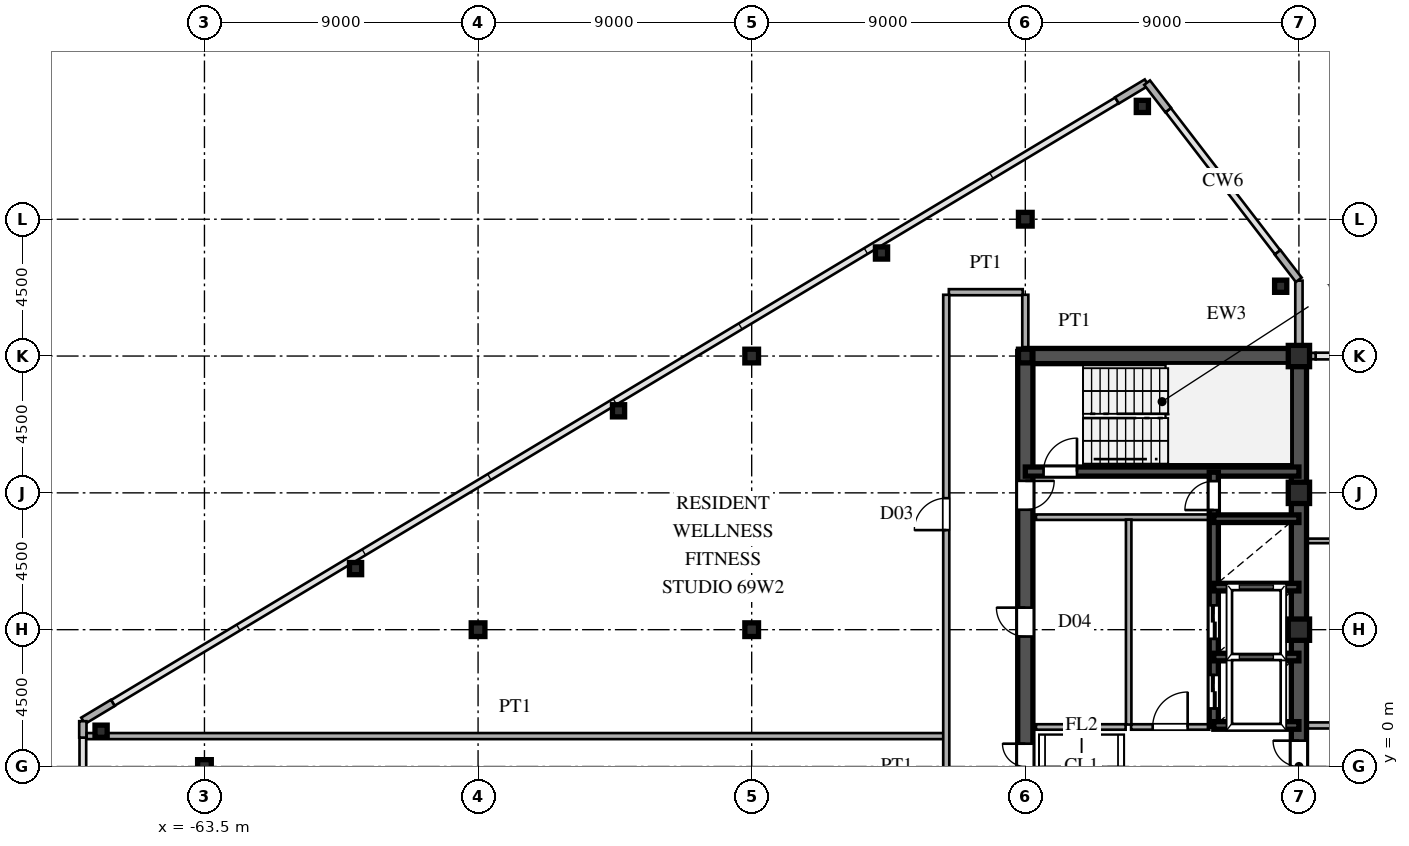
"""IFC4 building model, lengths in metres.
Left out: names, types, materials, properties, quantities, classifications, styles, units other than length and angle.
Written with IfcOpenShell. Run it as: python <this file> out.ifc"""

import sys

from ifc_helpers import new_model, si_unit, direction, frame, frame_2d, origin, origin_2d, place, context, subcontext, project, spatial, rectangle, hollow_rectangle, i_section, extrude, source, transform, mapped, element, fill, save


model = new_model("IFC4")
c1 = context("Model", 3, precision=1e-05, world=origin(), true_north=direction((0.0, 1.0)))
c2 = subcontext(c1, "Body", "Model", "MODEL_VIEW")
j1 = project(units=[si_unit("LENGTHUNIT", "METRE"), si_unit("PLANEANGLEUNIT", "RADIAN")], contexts=[c1])
p1 = place(None, origin())
s1 = spatial("IfcSite", under=j1, at=p1, CompositionType="ELEMENT")
p2 = place(p1, origin())
s2 = spatial("IfcBuilding", under=s1, at=p2, CompositionType="ELEMENT")
p3 = place(p2, frame((0.0, 0.0, 261.9)))
s3 = spatial("IfcBuildingStorey", under=s2, at=p3, CompositionType="ELEMENT", Elevation=261.9)
m1 = source(origin(), c2, "Body", "SweptSolid", [
    extrude(hollow_rectangle(XDim=0.7, YDim=0.7, WallThickness=0.03, at=origin_2d()), origin(), (0.0, 0.0, 1.0), 3.75),
])
for number, where, z_axis, x_axis in (
    (1, (-27.5, 4.5, 0.0), (0.0, 0.0, 1.0), (1.0, 0.0, 0.0)),
    (2, (-27.5, 9.0, 0.0), (0.0, 0.0, 1.0), (1.0, 0.0, 0.0)),
    (3, (-27.5, 13.5, 0.0), (0.0, 0.0, 1.0), (1.0, 0.0, 0.0)),
):
    element("IfcColumn", number, at=place(p3, frame(where, z_axis=z_axis, x_axis=x_axis)), inside=s3, PredefinedType="COLUMN", context=c2, shape_type="MappedRepresentation", body=[
        mapped(m1, transform((0.0, 0.0, 0.0), scale=1.0)),
    ])
m2 = source(origin(), c2, "Body", "SweptSolid", [
    extrude(i_section(OverallWidth=0.45, OverallDepth=0.45, WebThickness=0.016, FlangeThickness=0.025, at=origin_2d()), origin(), (0.0, 0.0, 1.0), 3.75),
])
for number, where, z_axis, x_axis in (
    (4, (-36.5, 13.5, 0.0), (0.0, 0.0, 1.0), (1.0, 0.0, 0.0)),
    (5, (-36.5, 18.0, 0.0), (0.0, 0.0, 1.0), (1.0, 0.0, 0.0)),
    (6, (-45.5, 4.5, 0.0), (0.0, 0.0, 1.0), (1.0, 0.0, 0.0)),
    (7, (-45.5, 13.5, 0.0), (0.0, 0.0, 1.0), (1.0, 0.0, 0.0)),
    (8, (-54.5, 4.5, 0.0), (0.0, 0.0, 1.0), (1.0, 0.0, 0.0)),
    (9, (-63.5, 0.0, 0.0), (0.0, 0.0, 1.0), (1.0, 0.0, 0.0)),
):
    element("IfcColumn", number, at=place(p3, frame(where, z_axis=z_axis, x_axis=x_axis)), inside=s3, PredefinedType="COLUMN", context=c2, shape_type="MappedRepresentation", body=[
        mapped(m2, transform((0.0, 0.0, 0.0), scale=1.0)),
    ])
m3 = source(origin(), c2, "Body", "SweptSolid", [
    extrude(hollow_rectangle(XDim=0.4, YDim=0.4, WallThickness=0.016, at=origin_2d()), origin(), (0.0, 0.0, 1.0), 3.75),
])
for number, where, z_axis, x_axis in (
    (10, (-28.1, 15.796, 0.0), (0.0, 0.0, 1.0), (1.0, 0.0, 0.0)),
    (11, (-32.65, 21.71, 0.0), (0.0, 0.0, 1.0), (1.0, 0.0, 0.0)),
    (12, (-66.9, 1.16, 0.0), (0.0, 0.0, 1.0), (1.0, 0.0, 0.0)),
    (13, (-41.23, 16.889, 0.0), (0.0, 0.0, 1.0), (1.0, 0.0, 0.0)),
    (14, (-49.88, 11.699, 0.0), (0.0, 0.0, 1.0), (1.0, 0.0, 0.0)),
    (15, (-58.53, 6.509, 0.0), (0.0, 0.0, 1.0), (1.0, 0.0, 0.0)),
):
    element("IfcColumn", number, at=place(p3, frame(where, z_axis=z_axis, x_axis=x_axis)), inside=s3, PredefinedType="COLUMN", context=c2, shape_type="MappedRepresentation", body=[
        mapped(m3, transform((0.0, 0.0, 0.0), scale=1.0)),
    ])
p4 = place(p3, frame((-27.5, 13.755, 0.0), z_axis=(0.0, 0.0, 1.0), x_axis=(0.0, 1.0, 0.0)))
e16 = element("IfcWall", 16, at=p4, inside=s3, PredefinedType="SOLIDWALL", context=c2, shape_type="SweptSolid", body=[
    extrude(rectangle(XDim=0.62, YDim=0.24, at=frame_2d((0.31, 0.0))), origin(), (0.0, 0.0, 1.0), 3.03),
])
p5 = place(p3, frame((-27.5, 14.375, 0.0), z_axis=(0.0, 0.0, 1.0), x_axis=(0.0, 1.0, 0.0)))
e17 = element("IfcWall", 17, at=p5, inside=s3, PredefinedType="SOLIDWALL", context=c2, shape_type="SweptSolid", body=[
    extrude(rectangle(XDim=1.605, YDim=0.24, at=frame_2d((0.803, 0.0))), origin(), (0.0, 0.0, 1.0), 3.53),
])
for number, where, z_axis, x_axis in (
    (18, (-27.506, 16.008, 0.0), (0.0, 0.0, 1.0), (-0.61, 0.793, 0.0)),
    (19, (-31.799, 21.588, 0.0), (0.0, 0.0, 1.0), (-0.61, 0.793, 0.0)),
    (20, (-32.509, 22.495, 0.0), (0.0, 0.0, 1.0), (-0.857, -0.515, 0.0)),
    (21, (-66.514, 2.092, 0.0), (0.0, 0.0, 1.0), (-0.857, -0.515, 0.0)),
):
    element("IfcWall", number, at=place(p3, frame(where, z_axis=z_axis, x_axis=x_axis)), inside=s3, PredefinedType="SOLIDWALL", context=c2, shape_type="SweptSolid", body=[
        extrude(rectangle(XDim=1.14, YDim=0.24, at=frame_2d((0.57, 0.0))), origin(), (0.0, 0.0, 1.0), 3.53),
    ])
p6 = place(p3, frame((-67.5, 1.49, 0.0), z_axis=(0.0, 0.0, 1.0), x_axis=(0.0, -1.0, 0.0)))
e22 = element("IfcWall", 22, at=p6, inside=s3, PredefinedType="SOLIDWALL", context=c2, shape_type="SweptSolid", body=[
    extrude(rectangle(XDim=0.54, YDim=0.24, at=frame_2d((0.27, 0.0))), origin(), (0.0, 0.0, 1.0), 3.53),
])
p7 = place(p3, frame((-27.49, 13.5, 0.0), z_axis=(0.0, 0.0, 1.0), x_axis=(1.0, 0.0, 0.0)))
e23 = element("IfcWall", 23, at=p7, inside=s3, PredefinedType="SOLIDWALL", context=c2, shape_type="SweptSolid", body=[
    extrude(rectangle(XDim=0.54, YDim=0.21, at=frame_2d((0.27, 0.0))), origin(), (0.0, 0.0, 1.0), 3.03),
])
p8 = place(p3, frame((-27.5, 1.3, 0.0), z_axis=(0.0, 0.0, 1.0), x_axis=(0.0, 1.0, 0.0)))
e24 = element("IfcWall", 24, at=p8, inside=s3, PredefinedType="SHEAR", context=c2, shape_type="SweptSolid", body=[
    extrude(rectangle(XDim=12.2, YDim=0.5, at=frame_2d((6.1, 0.0))), origin(), (0.0, 0.0, 1.0), 3.53),
])
p9 = place(p3, frame((-27.5, -1.3, 0.0), z_axis=(0.0, 0.0, 1.0), x_axis=(0.0, 1.0, 0.0)))
e25 = element("IfcWall", 25, at=p9, inside=s3, PredefinedType="SHEAR", context=c2, shape_type="SweptSolid", body=[
    extrude(rectangle(XDim=2.6, YDim=0.5, at=frame_2d((1.3, 0.0))), origin(), (0.0, 0.0, 1.0), 3.53),
])
p10 = place(p9, frame((0.45, 0.0, 0.0)))
e26 = element("IfcOpeningElement", 26, at=p10, cuts=e25, PredefinedType="OPENING", context=c2, shape_type="SweptSolid", body=[
    extrude(rectangle(XDim=1.7, YDim=2.35, at=frame_2d((0.85, 1.175))), frame((0.0, 0.26, 0.0), z_axis=(0.0, -1.0, 0.0), x_axis=(1.0, 0.0, 0.0)), (0.0, 0.0, 1.0), 0.52),
])
p11 = place(p3, frame((-36.5, 13.5, 0.0), z_axis=(0.0, 0.0, 1.0), x_axis=(1.0, 0.0, 0.0)))
e27 = element("IfcWall", 27, at=p11, inside=s3, PredefinedType="SHEAR", context=c2, shape_type="SweptSolid", body=[
    extrude(rectangle(XDim=9.0, YDim=0.5, at=frame_2d((4.5, 0.0))), origin(), (0.0, 0.0, 1.0), 3.53),
])
p12 = place(p3, frame((-36.5, -1.3, 0.0), z_axis=(0.0, 0.0, 1.0), x_axis=(0.0, 1.0, 0.0)))
e28 = element("IfcWall", 28, at=p12, inside=s3, PredefinedType="SHEAR", context=c2, shape_type="SweptSolid", body=[
    extrude(rectangle(XDim=2.6, YDim=0.5, at=frame_2d((1.3, 0.0))), origin(), (0.0, 0.0, 1.0), 3.53),
])
p13 = place(p12, frame((0.55, 0.0, 0.0)))
e29 = element("IfcOpeningElement", 29, at=p13, cuts=e28, PredefinedType="OPENING", context=c2, shape_type="SweptSolid", body=[
    extrude(rectangle(XDim=1.5, YDim=2.3, at=frame_2d((0.75, 1.15))), frame((0.0, 0.26, 0.0), z_axis=(0.0, -1.0, 0.0), x_axis=(1.0, 0.0, 0.0)), (0.0, 0.0, 1.0), 0.52),
])
p14 = place(p3, frame((-36.5, 8.2, 0.0), z_axis=(0.0, 0.0, 1.0), x_axis=(0.0, 1.0, 0.0)))
e30 = element("IfcWall", 30, at=p14, inside=s3, PredefinedType="SHEAR", context=c2, shape_type="SweptSolid", body=[
    extrude(rectangle(XDim=5.45, YDim=0.5, at=frame_2d((2.725, 0.0))), origin(), (0.0, 0.0, 1.0), 3.53),
])
p15 = place(p14, frame((0.245, 0.0, 0.0)))
e31 = element("IfcOpeningElement", 31, at=p15, cuts=e30, PredefinedType="OPENING", context=c2, shape_type="SweptSolid", body=[
    extrude(rectangle(XDim=0.95, YDim=2.15, at=frame_2d((0.475, 1.075))), frame((0.0, 0.26, 0.0), z_axis=(0.0, -1.0, 0.0), x_axis=(1.0, 0.0, 0.0)), (0.0, 0.0, 1.0), 0.52),
])
p16 = place(p3, frame((-36.5, 1.3, 0.0), z_axis=(0.0, 0.0, 1.0), x_axis=(0.0, 1.0, 0.0)))
e32 = element("IfcWall", 32, at=p16, inside=s3, PredefinedType="SHEAR", context=c2, shape_type="SweptSolid", body=[
    extrude(rectangle(XDim=6.9, YDim=0.5, at=frame_2d((3.45, 0.0))), origin(), (0.0, 0.0, 1.0), 3.53),
])
p17 = place(p16, frame((2.975, 0.0, 0.0)))
e33 = element("IfcOpeningElement", 33, at=p17, cuts=e32, PredefinedType="OPENING", context=c2, shape_type="SweptSolid", body=[
    extrude(rectangle(XDim=0.95, YDim=2.15, at=frame_2d((0.475, 1.075))), frame((0.0, 0.26, 0.0), z_axis=(0.0, -1.0, 0.0), x_axis=(1.0, 0.0, 0.0)), (0.0, 0.0, 1.0), 0.52),
])
p18 = place(p3, frame((-36.5, 9.7, 0.0), z_axis=(0.0, 0.0, 1.0), x_axis=(1.0, 0.0, 0.0)))
e34 = element("IfcWall", 34, at=p18, inside=s3, PredefinedType="SHEAR", context=c2, shape_type="SweptSolid", body=[
    extrude(rectangle(XDim=9.0, YDim=0.3, at=frame_2d((4.5, 0.0))), origin(), (0.0, 0.0, 1.0), 3.53),
])
p19 = place(p18, frame((0.6, 0.0, 0.0)))
e35 = element("IfcOpeningElement", 35, at=p19, cuts=e34, PredefinedType="OPENING", context=c2, shape_type="SweptSolid", body=[
    extrude(rectangle(XDim=1.1, YDim=2.2, at=frame_2d((0.55, 1.1))), frame((0.0, 0.16, 0.0), z_axis=(0.0, -1.0, 0.0), x_axis=(1.0, 0.0, 0.0)), (0.0, 0.0, 1.0), 0.32),
])
for number, where, z_axis, x_axis in (
    (36, (-30.3, 1.35, 0.0), (0.0, 0.0, 1.0), (1.0, 0.0, 0.0)),
    (37, (-30.3, 3.6, 0.0), (0.0, 0.0, 1.0), (1.0, 0.0, 0.0)),
    (38, (-30.3, 5.9, 0.0), (0.0, 0.0, 1.0), (1.0, 0.0, 0.0)),
    (39, (-30.3, 8.15, 0.0), (0.0, 0.0, 1.0), (1.0, 0.0, 0.0)),
):
    element("IfcWall", number, at=place(p3, frame(where, z_axis=z_axis, x_axis=x_axis)), inside=s3, PredefinedType="SHEAR", context=c2, shape_type="SweptSolid", body=[
        extrude(rectangle(XDim=2.8, YDim=0.25, at=frame_2d((1.4, 0.0))), origin(), (0.0, 0.0, 1.0), 3.53),
    ])
p20 = place(p3, frame((-30.3, 1.32, 0.0), z_axis=(0.0, 0.0, 1.0), x_axis=(0.0, 1.0, 0.0)))
e40 = element("IfcWall", 40, at=p20, inside=s3, PredefinedType="SHEAR", context=c2, shape_type="SweptSolid", body=[
    extrude(rectangle(XDim=2.28, YDim=0.3, at=frame_2d((1.14, 0.0))), origin(), (0.0, 0.0, 1.0), 3.53),
])
p21 = place(p20, frame((0.59, 0.0, 0.0)))
e41 = element("IfcOpeningElement", 41, at=p21, cuts=e40, PredefinedType="OPENING", context=c2, shape_type="SweptSolid", body=[
    extrude(rectangle(XDim=1.1, YDim=2.2, at=frame_2d((0.55, 1.1))), frame((0.0, 0.16, 0.0), z_axis=(0.0, -1.0, 0.0), x_axis=(1.0, 0.0, 0.0)), (0.0, 0.0, 1.0), 0.32),
])
p22 = place(p3, frame((-30.3, 3.6, 0.0), z_axis=(0.0, 0.0, 1.0), x_axis=(0.0, 1.0, 0.0)))
e42 = element("IfcWall", 42, at=p22, inside=s3, PredefinedType="SHEAR", context=c2, shape_type="SweptSolid", body=[
    extrude(rectangle(XDim=2.3, YDim=0.3, at=frame_2d((1.15, 0.0))), origin(), (0.0, 0.0, 1.0), 3.53),
])
p23 = place(p22, frame((0.6, 0.0, 0.0)))
e43 = element("IfcOpeningElement", 43, at=p23, cuts=e42, PredefinedType="OPENING", context=c2, shape_type="SweptSolid", body=[
    extrude(rectangle(XDim=1.1, YDim=2.2, at=frame_2d((0.55, 1.1))), frame((0.0, 0.16, 0.0), z_axis=(0.0, -1.0, 0.0), x_axis=(1.0, 0.0, 0.0)), (0.0, 0.0, 1.0), 0.32),
])
p24 = place(p3, frame((-30.3, 5.9, 0.0), z_axis=(0.0, 0.0, 1.0), x_axis=(0.0, 1.0, 0.0)))
e44 = element("IfcWall", 44, at=p24, inside=s3, PredefinedType="SHEAR", context=c2, shape_type="SweptSolid", body=[
    extrude(rectangle(XDim=2.25, YDim=0.3, at=frame_2d((1.125, 0.0))), origin(), (0.0, 0.0, 1.0), 3.53),
])
p25 = place(p3, frame((-30.3, 8.15, 0.0), z_axis=(0.0, 0.0, 1.0), x_axis=(0.0, 1.0, 0.0)))
e45 = element("IfcWall", 45, at=p25, inside=s3, PredefinedType="SHEAR", context=c2, shape_type="SweptSolid", body=[
    extrude(rectangle(XDim=1.53, YDim=0.3, at=frame_2d((0.765, 0.0))), origin(), (0.0, 0.0, 1.0), 3.53),
])
p26 = place(p25, frame((0.285, 0.0, 0.0)))
e46 = element("IfcOpeningElement", 46, at=p26, cuts=e45, PredefinedType="OPENING", context=c2, shape_type="SweptSolid", body=[
    extrude(rectangle(XDim=0.95, YDim=2.15, at=frame_2d((0.475, 1.075))), frame((0.0, 0.16, 0.0), z_axis=(0.0, -1.0, 0.0), x_axis=(1.0, 0.0, 0.0)), (0.0, 0.0, 1.0), 0.32),
])
p27 = place(p3, frame((-36.15, 8.2, 0.0), z_axis=(0.0, 0.0, 1.0), x_axis=(1.0, 0.0, 0.0)))
e47 = element("IfcWall", 47, at=p27, inside=s3, PredefinedType="PARTITIONING", context=c2, shape_type="SweptSolid", body=[
    extrude(rectangle(XDim=5.7, YDim=0.18, at=frame_2d((2.85, 0.0))), origin(), (0.0, 0.0, 1.0), 3.53),
])
p28 = place(p3, frame((-33.1, 1.38, 0.0), z_axis=(0.0, 0.0, 1.0), x_axis=(0.0, 1.0, 0.0)))
e48 = element("IfcWall", 48, at=p28, inside=s3, PredefinedType="PARTITIONING", context=c2, shape_type="SweptSolid", body=[
    extrude(rectangle(XDim=6.74, YDim=0.18, at=frame_2d((3.37, 0.0))), origin(), (0.0, 0.0, 1.0), 3.53),
])
p29 = place(p3, frame((-33.02, 1.3, 0.0), z_axis=(0.0, 0.0, 1.0), x_axis=(1.0, 0.0, 0.0)))
e49 = element("IfcWall", 49, at=p29, inside=s3, PredefinedType="PARTITIONING", context=c2, shape_type="SweptSolid", body=[
    extrude(rectangle(XDim=2.57, YDim=0.18, at=frame_2d((1.285, 0.0))), origin(), (0.0, 0.0, 1.0), 3.53),
])
p30 = place(p29, frame((0.71, 0.0, 0.0)))
e50 = element("IfcOpeningElement", 50, at=p30, cuts=e49, PredefinedType="OPENING", context=c2, shape_type="SweptSolid", body=[
    extrude(rectangle(XDim=1.15, YDim=2.2, at=frame_2d((0.575, 1.1))), frame((0.0, 0.1, 0.0), z_axis=(0.0, -1.0, 0.0), x_axis=(1.0, 0.0, 0.0)), (0.0, 0.0, 1.0), 0.2),
])
p31 = place(p3, frame((-36.15, 1.3, 0.0), z_axis=(0.0, 0.0, 1.0), x_axis=(1.0, 0.0, 0.0)))
e51 = element("IfcWall", 51, at=p31, inside=s3, PredefinedType="PARTITIONING", context=c2, shape_type="SweptSolid", body=[
    extrude(rectangle(XDim=2.95, YDim=0.18, at=frame_2d((1.475, 0.0))), origin(), (0.0, 0.0, 1.0), 3.53),
])
p32 = place(p3, frame((-67.375, 1.0, 0.0), z_axis=(0.0, 0.0, 1.0), x_axis=(1.0, 0.0, 0.0)))
e52 = element("IfcWall", 52, at=p32, inside=s3, PredefinedType="PARTITIONING", context=c2, shape_type="SweptSolid", body=[
    extrude(rectangle(XDim=28.195, YDim=0.2, at=frame_2d((14.098, 0.0))), origin(), (0.0, 0.0, 1.0), 3.53),
])
p33 = place(p3, frame((-27.245, 1.35, 0.0), z_axis=(0.0, 0.0, 1.0), x_axis=(1.0, 0.0, 0.0)))
e53 = element("IfcWall", 53, at=p33, inside=s3, PredefinedType="PARTITIONING", context=c2, shape_type="SweptSolid", body=[
    extrude(rectangle(XDim=54.49, YDim=0.2, at=frame_2d((27.245, 0.0))), origin(), (0.0, 0.0, 1.0), 3.53),
])
p34 = place(p33, frame((22.47, 0.0, 0.0)))
e54 = element("IfcOpeningElement", 54, at=p34, cuts=e53, PredefinedType="OPENING", context=c2, shape_type="SweptSolid", body=[
    extrude(rectangle(XDim=1.05, YDim=2.25, at=frame_2d((0.525, 1.125))), frame((0.0, 0.11, 0.0), z_axis=(0.0, -1.0, 0.0), x_axis=(1.0, 0.0, 0.0)), (0.0, 0.0, 1.0), 0.22),
])
p35 = place(p3, frame((-27.245, 7.42, 0.0), z_axis=(0.0, 0.0, 1.0), x_axis=(1.0, 0.0, 0.0)))
e55 = element("IfcWall", 55, at=p35, inside=s3, PredefinedType="PARTITIONING", context=c2, shape_type="SweptSolid", body=[
    extrude(rectangle(XDim=6.16, YDim=0.15, at=frame_2d((3.08, 0.0))), origin(), (0.0, 0.0, 1.0), 3.53),
])
p36 = place(p35, frame((2.82, 0.0, 0.0)))
e56 = element("IfcOpeningElement", 56, at=p36, cuts=e55, PredefinedType="OPENING", context=c2, shape_type="SweptSolid", body=[
    extrude(rectangle(XDim=0.95, YDim=2.15, at=frame_2d((0.475, 1.075))), frame((0.0, 0.085, 0.0), z_axis=(0.0, -1.0, 0.0), x_axis=(1.0, 0.0, 0.0)), (0.0, 0.0, 1.0), 0.17),
])
p37 = place(p3, frame((-39.015, 15.6, 0.0), z_axis=(0.0, 0.0, 1.0), x_axis=(1.0, 0.0, 0.0)))
e57 = element("IfcWall", 57, at=p37, inside=s3, PredefinedType="PARTITIONING", context=c2, shape_type="SweptSolid", body=[
    extrude(rectangle(XDim=2.43, YDim=0.2, at=frame_2d((1.215, 0.0))), origin(), (0.0, 0.0, 1.0), 3.53),
])
p38 = place(p3, frame((-39.1, -15.515, 0.0), z_axis=(0.0, 0.0, 1.0), x_axis=(0.0, 1.0, 0.0)))
e58 = element("IfcWall", 58, at=p38, inside=s3, PredefinedType="PARTITIONING", context=c2, shape_type="SweptSolid", body=[
    extrude(rectangle(XDim=31.03, YDim=0.2, at=frame_2d((15.515, 0.0))), origin(), (0.0, 0.0, 1.0), 3.53),
])
p39 = place(p38, frame((7.69, 0.0, 0.0)))
e59 = element("IfcOpeningElement", 59, at=p39, cuts=e58, PredefinedType="OPENING", context=c2, shape_type="SweptSolid", body=[
    extrude(rectangle(XDim=1.05, YDim=2.25, at=frame_2d((0.525, 1.125))), frame((0.0, 0.11, 0.0), z_axis=(0.0, -1.0, 0.0), x_axis=(1.0, 0.0, 0.0)), (0.0, 0.0, 1.0), 0.22),
])
p40 = place(p38, frame((23.29, 0.0, 0.0)))
e60 = element("IfcOpeningElement", 60, at=p40, cuts=e58, PredefinedType="OPENING", context=c2, shape_type="SweptSolid", body=[
    extrude(rectangle(XDim=1.05, YDim=2.25, at=frame_2d((0.525, 1.125))), frame((0.0, 0.11, 0.0), z_axis=(0.0, -1.0, 0.0), x_axis=(1.0, 0.0, 0.0)), (0.0, 0.0, 1.0), 0.22),
])
p41 = place(p3, frame((-36.5, 13.755, 0.0), z_axis=(0.0, 0.0, 1.0), x_axis=(0.0, 1.0, 0.0)))
e61 = element("IfcWall", 61, at=p41, inside=s3, PredefinedType="PARTITIONING", context=c2, shape_type="SweptSolid", body=[
    extrude(rectangle(XDim=1.76, YDim=0.2, at=frame_2d((0.88, 0.0))), origin(), (0.0, 0.0, 1.0), 2.93),
])
m4 = source(origin(), c2, "Body", "SweptSolid", [
    extrude(rectangle(XDim=1.7, YDim=2.35, at=frame_2d((0.85, 1.175))), frame((0.0, 0.025, 0.0), z_axis=(0.0, -1.0, 0.0), x_axis=(1.0, 0.0, 0.0)), (0.0, 0.0, 1.0), 0.05),
])
p42 = place(p10, origin())
e62 = element("IfcDoor", 62, at=p42, inside=s3, OperationType="DOUBLE_SWING_LEFT", PredefinedType="DOOR", context=c2, shape_type="MappedRepresentation", body=[
    mapped(m4, transform((0.0, 0.0, 0.0), scale=1.0)),
])
fill(e26, e62)
m5 = source(origin(), c2, "Body", "SweptSolid", [
    extrude(rectangle(XDim=1.5, YDim=2.3, at=frame_2d((0.75, 1.15))), frame((0.0, 0.025, 0.0), z_axis=(0.0, -1.0, 0.0), x_axis=(1.0, 0.0, 0.0)), (0.0, 0.0, 1.0), 0.05),
])
p43 = place(p13, origin())
e63 = element("IfcDoor", 63, at=p43, inside=s3, OperationType="DOUBLE_SWING_LEFT", PredefinedType="DOOR", context=c2, shape_type="MappedRepresentation", body=[
    mapped(m5, transform((0.0, 0.0, 0.0), scale=1.0)),
])
fill(e29, e63)
m6 = source(origin(), c2, "Body", "SweptSolid", [
    extrude(rectangle(XDim=0.95, YDim=2.15, at=frame_2d((0.475, 1.075))), frame((0.0, 0.025, 0.0), z_axis=(0.0, -1.0, 0.0), x_axis=(1.0, 0.0, 0.0)), (0.0, 0.0, 1.0), 0.05),
])
p44 = place(p15, frame((0.95, 0.0, 0.0), z_axis=(0.0, 0.0, 1.0), x_axis=(-1.0, 0.0, 0.0)))
e64 = element("IfcDoor", 64, at=p44, inside=s3, OperationType="SINGLE_SWING_RIGHT", PredefinedType="DOOR", context=c2, shape_type="MappedRepresentation", body=[
    mapped(m6, transform((0.0, 0.0, 0.0), scale=1.0)),
])
fill(e31, e64)
p45 = place(p17, origin())
e65 = element("IfcDoor", 65, at=p45, inside=s3, OperationType="SINGLE_SWING_RIGHT", PredefinedType="DOOR", context=c2, shape_type="MappedRepresentation", body=[
    mapped(m6, transform((0.0, 0.0, 0.0), scale=1.0)),
])
fill(e33, e65)
m7 = source(origin(), c2, "Body", "SweptSolid", [
    extrude(rectangle(XDim=1.1, YDim=2.2, at=frame_2d((0.55, 1.1))), frame((0.0, 0.025, 0.0), z_axis=(0.0, -1.0, 0.0), x_axis=(1.0, 0.0, 0.0)), (0.0, 0.0, 1.0), 0.05),
])
p46 = place(p19, origin())
e66 = element("IfcDoor", 66, at=p46, inside=s3, OperationType="SINGLE_SWING_RIGHT", PredefinedType="DOOR", context=c2, shape_type="MappedRepresentation", body=[
    mapped(m7, transform((0.0, 0.0, 0.0), scale=1.0)),
])
fill(e35, e66)
m8 = source(origin(), c2, "Body", "SweptSolid", [
    extrude(rectangle(XDim=1.1, YDim=2.2, at=frame_2d((0.55, 1.1))), frame((0.0, 0.025, 0.0), z_axis=(0.0, -1.0, 0.0), x_axis=(1.0, 0.0, 0.0)), (0.0, 0.0, 1.0), 0.05),
])
p47 = place(p21, origin())
e67 = element("IfcDoor", 67, at=p47, inside=s3, OperationType="DOUBLE_DOOR_SLIDING", PredefinedType="DOOR", context=c2, shape_type="MappedRepresentation", body=[
    mapped(m8, transform((0.0, 0.0, 0.0), scale=1.0)),
])
fill(e41, e67)
p48 = place(p23, origin())
e68 = element("IfcDoor", 68, at=p48, inside=s3, OperationType="DOUBLE_DOOR_SLIDING", PredefinedType="DOOR", context=c2, shape_type="MappedRepresentation", body=[
    mapped(m8, transform((0.0, 0.0, 0.0), scale=1.0)),
])
fill(e43, e68)
p49 = place(p26, origin())
e69 = element("IfcDoor", 69, at=p49, inside=s3, OperationType="SINGLE_SWING_LEFT", PredefinedType="DOOR", context=c2, shape_type="MappedRepresentation", body=[
    mapped(m6, transform((0.0, 0.0, 0.0), scale=1.0)),
])
fill(e46, e69)
m9 = source(origin(), c2, "Body", "SweptSolid", [
    extrude(rectangle(XDim=1.15, YDim=2.2, at=frame_2d((0.575, 1.1))), frame((0.0, 0.025, 0.0), z_axis=(0.0, -1.0, 0.0), x_axis=(1.0, 0.0, 0.0)), (0.0, 0.0, 1.0), 0.05),
])
p50 = place(p30, origin())
e70 = element("IfcDoor", 70, at=p50, inside=s3, OperationType="SINGLE_SWING_RIGHT", PredefinedType="DOOR", context=c2, shape_type="MappedRepresentation", body=[
    mapped(m9, transform((0.0, 0.0, 0.0), scale=1.0)),
])
fill(e50, e70)
m10 = source(origin(), c2, "Body", "SweptSolid", [
    extrude(rectangle(XDim=1.05, YDim=2.25, at=frame_2d((0.525, 1.125))), frame((0.0, 0.025, 0.0), z_axis=(0.0, -1.0, 0.0), x_axis=(1.0, 0.0, 0.0)), (0.0, 0.0, 1.0), 0.05),
])
p51 = place(p40, origin())
e71 = element("IfcDoor", 71, at=p51, inside=s3, OperationType="SINGLE_SWING_LEFT", PredefinedType="DOOR", context=c2, shape_type="MappedRepresentation", body=[
    mapped(m10, transform((0.0, 0.0, 0.0), scale=1.0)),
])
fill(e60, e71)
save(model, sys.argv[1])
